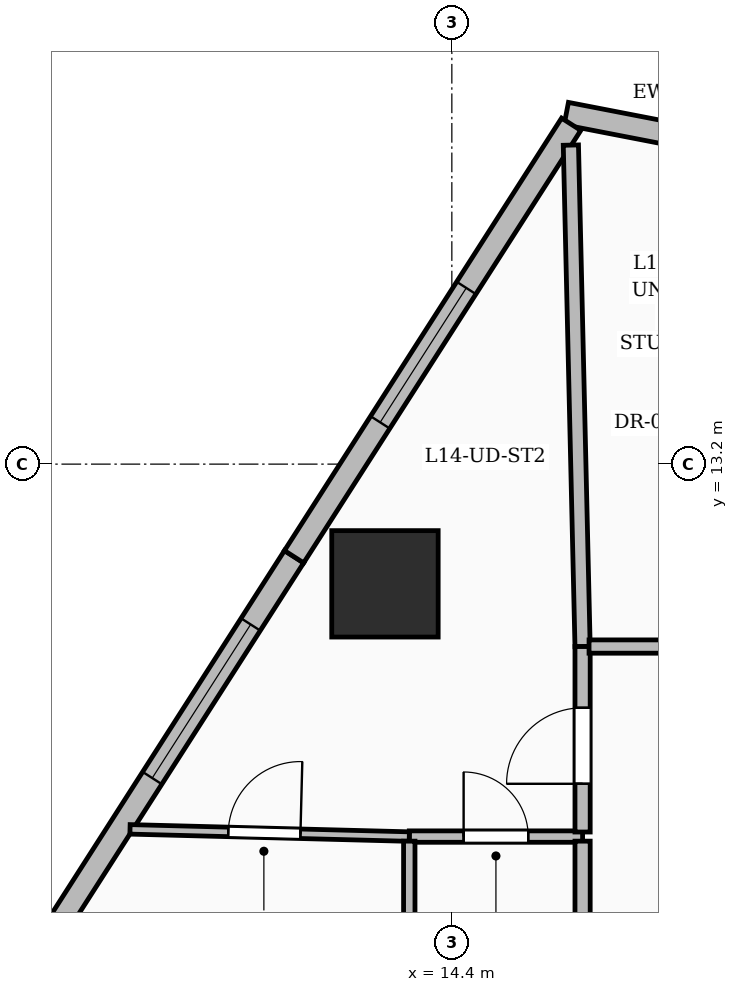
"""IFC4 building model, lengths in metres.
Left out: names, types, materials, properties, quantities, classifications, styles, units other than length and angle.
Written with IfcOpenShell. Run it as: python <this file> out.ifc"""

import sys

from ifc_helpers import new_model, si_unit, direction, frame, frame_2d, origin, origin_2d, place, context, subcontext, project, spatial, rectangle, extrude, element, fill, save


model = new_model("IFC4")
c1 = context("Model", 3, precision=1e-05, world=origin(), true_north=direction((0.0, 1.0)))
c2 = subcontext(c1, "Body", "Model", "MODEL_VIEW")
j1 = project(units=[si_unit("LENGTHUNIT", "METRE"), si_unit("PLANEANGLEUNIT", "RADIAN")], contexts=[c1])
p1 = place(None, origin())
s1 = spatial("IfcSite", under=j1, at=p1, CompositionType="ELEMENT")
p2 = place(p1, origin())
s2 = spatial("IfcBuilding", under=s1, at=p2, CompositionType="ELEMENT")
p3 = place(p2, frame((0.0, 0.0, 60.6)))
s3 = spatial("IfcBuildingStorey", under=s2, at=p3, CompositionType="ELEMENT", Elevation=60.6)
p4 = place(p3, frame((13.52, 11.625, 0.0), z_axis=(0.0, 0.0, 1.0), x_axis=(1.0, 0.0, 0.0)))
e1 = element("IfcColumn", 1, at=p4, inside=s3, PredefinedType="COLUMN", context=c2, shape_type="SweptSolid", body=[
    extrude(rectangle(XDim=1.4, YDim=1.4, at=origin_2d()), origin(), (0.0, 0.0, 1.0), 3.6),
])
p5 = place(p3, frame((15.906, 17.812, 0.0), z_axis=(0.0, 0.0, 1.0), x_axis=(0.981749415704, -0.190179086032, 0.0)))
e2 = element("IfcWall", 2, at=p5, inside=s3, PredefinedType="SOLIDWALL", context=c2, shape_type="SweptSolid", body=[
    extrude(rectangle(XDim=2.801, YDim=0.3, at=frame_2d((1.4, 0.0))), origin(), (0.0, 0.0, 1.0), 2.375),
])
p6 = place(p3, frame((8.859, 6.574, 0.0), z_axis=(0.0, 0.0, 1.0), x_axis=(0.539539001193, 0.841960608456, 0.0)))
e3 = element("IfcWall", 3, at=p6, inside=s3, PredefinedType="SOLIDWALL", context=c2, shape_type="SweptSolid", body=[
    extrude(rectangle(XDim=6.423, YDim=0.3, at=frame_2d((3.211, 0.0))), origin(), (0.0, 0.0, 1.0), 3.35),
])
p7 = place(p6, frame((2.965, 0.0, 0.6)))
e4 = element("IfcOpeningElement", 4, at=p7, cuts=e3, PredefinedType="OPENING", context=c2, shape_type="SweptSolid", body=[
    extrude(rectangle(XDim=2.4, YDim=2.1, at=frame_2d((1.2, 1.05))), frame((0.0, 0.16, 0.0), z_axis=(0.0, -1.0, 0.0), x_axis=(1.0, 0.0, 0.0)), (0.0, 0.0, 1.0), 0.32),
])
p8 = place(p3, frame((12.324, 11.981, 0.0), z_axis=(0.0, 0.0, 1.0), x_axis=(0.539544650361, 0.841956988371, 0.0)))
e5 = element("IfcWall", 5, at=p8, inside=s3, PredefinedType="SOLIDWALL", context=c2, shape_type="SweptSolid", body=[
    extrude(rectangle(XDim=6.758, YDim=0.3, at=frame_2d((3.379, 0.0))), origin(), (0.0, 0.0, 1.0), 3.35),
])
p9 = place(p8, frame((2.1, 0.0, 0.55)))
e6 = element("IfcOpeningElement", 6, at=p9, cuts=e5, PredefinedType="OPENING", context=c2, shape_type="SweptSolid", body=[
    extrude(rectangle(XDim=2.1, YDim=2.4, at=frame_2d((1.05, 1.2))), frame((0.0, 0.16, 0.0), z_axis=(0.0, -1.0, 0.0), x_axis=(1.0, 0.0, 0.0)), (0.0, 0.0, 1.0), 0.32),
])
p10 = place(p3, frame((13.84, 8.3, 0.0), z_axis=(0.0, 0.0, 1.0), x_axis=(1.0, 0.0, 0.0)))
e7 = element("IfcWall", 7, at=p10, inside=s3, PredefinedType="PARTITIONING", context=c2, shape_type="SweptSolid", body=[
    extrude(rectangle(XDim=2.28, YDim=0.15, at=frame_2d((1.14, 0.0))), origin(), (0.0, 0.0, 1.0), 2.37),
])
p11 = place(p10, frame((0.715, 0.0, 0.0)))
e8 = element("IfcOpeningElement", 8, at=p11, cuts=e7, PredefinedType="OPENING", context=c2, shape_type="SweptSolid", body=[
    extrude(rectangle(XDim=0.85, YDim=2.1, at=frame_2d((0.425, 1.05))), frame((0.0, 0.085, 0.0), z_axis=(0.0, -1.0, 0.0), x_axis=(1.0, 0.0, 0.0)), (0.0, 0.0, 1.0), 0.17),
])
p12 = place(p3, frame((10.166, 8.395, 0.0), z_axis=(0.0, 0.0, 1.0), x_axis=(0.999666084673, -0.025840262272, 0.0)))
e9 = element("IfcWall", 9, at=p12, inside=s3, PredefinedType="PARTITIONING", context=c2, shape_type="SweptSolid", body=[
    extrude(rectangle(XDim=3.675, YDim=0.125, at=frame_2d((1.838, 0.0))), origin(), (0.0, 0.0, 1.0), 3.35),
])
p13 = place(p12, frame((1.293, 0.0, 0.0)))
e10 = element("IfcOpeningElement", 10, at=p13, cuts=e9, PredefinedType="OPENING", context=c2, shape_type="SweptSolid", body=[
    extrude(rectangle(XDim=0.95, YDim=2.2, at=frame_2d((0.475, 1.1))), frame((0.0, 0.072, 0.0), z_axis=(0.0, -1.0, 0.0), x_axis=(1.0, 0.0, 0.0)), (0.0, 0.0, 1.0), 0.145),
])
p14 = place(p3, frame((16.12, 10.8, 0.0), z_axis=(0.0, 0.0, 1.0), x_axis=(-0.023345842867, 0.999727448668, 0.0)))
e11 = element("IfcWall", 11, at=p14, inside=s3, PredefinedType="PARTITIONING", context=c2, shape_type="SweptSolid", body=[
    extrude(rectangle(XDim=6.599, YDim=0.2, at=frame_2d((3.299, 0.0))), origin(), (0.0, 0.0, 1.0), 2.279),
])
p15 = place(p3, frame((16.12, 8.36, 0.0), z_axis=(0.0, 0.0, 1.0), x_axis=(0.0, 1.0, 0.0)))
e12 = element("IfcWall", 12, at=p15, inside=s3, PredefinedType="PARTITIONING", context=c2, shape_type="SweptSolid", body=[
    extrude(rectangle(XDim=2.44, YDim=0.2, at=frame_2d((1.22, 0.0))), origin(), (0.0, 0.0, 1.0), 2.279),
])
p16 = place(p15, frame((0.635, 0.0, 0.0)))
e13 = element("IfcOpeningElement", 13, at=p16, cuts=e12, PredefinedType="OPENING", context=c2, shape_type="SweptSolid", body=[
    extrude(rectangle(XDim=1.0, YDim=2.2, at=frame_2d((0.5, 1.1))), frame((0.0, 0.11, 0.0), z_axis=(0.0, -1.0, 0.0), x_axis=(1.0, 0.0, 0.0)), (0.0, 0.0, 1.0), 0.22),
])
p17 = place(p3, frame((13.84, 8.24, 0.0), z_axis=(0.0, 0.0, 1.0), x_axis=(0.0, -1.0, 0.0)))
e14 = element("IfcWall", 14, at=p17, inside=s3, PredefinedType="PARTITIONING", context=c2, shape_type="SweptSolid", body=[
    extrude(rectangle(XDim=6.34, YDim=0.15, at=frame_2d((3.17, 0.0))), origin(), (0.0, 0.0, 1.0), 3.35),
])
p18 = place(p3, frame((16.12, 4.64, 0.0), z_axis=(0.0, 0.0, 1.0), x_axis=(0.0, 1.0, 0.0)))
e15 = element("IfcWall", 15, at=p18, inside=s3, PredefinedType="PARTITIONING", context=c2, shape_type="SweptSolid", body=[
    extrude(rectangle(XDim=3.6, YDim=0.2, at=frame_2d((1.8, 0.0))), origin(), (0.0, 0.0, 1.0), 2.37),
])
p19 = place(p3, frame((16.205, 10.8, 0.0), z_axis=(0.0, 0.0, 1.0), x_axis=(1.0, 0.0, 0.0)))
e16 = element("IfcWall", 16, at=p19, inside=s3, PredefinedType="PARTITIONING", context=c2, shape_type="SweptSolid", body=[
    extrude(rectangle(XDim=2.605, YDim=0.175, at=frame_2d((1.302, 0.0))), origin(), (0.0, 0.0, 1.0), 2.279),
])
p20 = place(p7, origin())
e17 = element("IfcWindow", 17, at=p20, inside=s3, PartitioningType="SINGLE_PANEL", PredefinedType="WINDOW", context=c2, shape_type="SweptSolid", body=[
    extrude(rectangle(XDim=2.4, YDim=2.1, at=frame_2d((1.2, 1.05))), frame((0.0, 0.03, 0.0), z_axis=(0.0, -1.0, 0.0), x_axis=(1.0, 0.0, 0.0)), (0.0, 0.0, 1.0), 0.06),
])
fill(e4, e17)
p21 = place(p9, origin())
e18 = element("IfcWindow", 18, at=p21, inside=s3, PartitioningType="SINGLE_PANEL", PredefinedType="WINDOW", context=c2, shape_type="SweptSolid", body=[
    extrude(rectangle(XDim=2.1, YDim=2.4, at=frame_2d((1.05, 1.2))), frame((0.0, 0.03, 0.0), z_axis=(0.0, -1.0, 0.0), x_axis=(1.0, 0.0, 0.0)), (0.0, 0.0, 1.0), 0.06),
])
fill(e6, e18)
p22 = place(p13, origin())
e19 = element("IfcDoor", 19, at=p22, inside=s3, OperationType="SINGLE_SWING_RIGHT", PredefinedType="DOOR", context=c2, shape_type="SweptSolid", body=[
    extrude(rectangle(XDim=0.95, YDim=2.2, at=frame_2d((0.475, 1.1))), frame((0.0, 0.025, 0.0), z_axis=(0.0, -1.0, 0.0), x_axis=(1.0, 0.0, 0.0)), (0.0, 0.0, 1.0), 0.05),
])
fill(e10, e19)
p23 = place(p11, origin())
e20 = element("IfcDoor", 20, at=p23, inside=s3, OperationType="SINGLE_SWING_LEFT", PredefinedType="DOOR", context=c2, shape_type="SweptSolid", body=[
    extrude(rectangle(XDim=0.85, YDim=2.1, at=frame_2d((0.425, 1.05))), frame((0.0, 0.025, 0.0), z_axis=(0.0, -1.0, 0.0), x_axis=(1.0, 0.0, 0.0)), (0.0, 0.0, 1.0), 0.05),
])
fill(e8, e20)
p24 = place(p16, origin())
e21 = element("IfcDoor", 21, at=p24, inside=s3, OperationType="SINGLE_SWING_LEFT", PredefinedType="DOOR", context=c2, shape_type="SweptSolid", body=[
    extrude(rectangle(XDim=1.0, YDim=2.2, at=frame_2d((0.5, 1.1))), frame((0.0, 0.025, 0.0), z_axis=(0.0, -1.0, 0.0), x_axis=(1.0, 0.0, 0.0)), (0.0, 0.0, 1.0), 0.05),
])
fill(e13, e21)
save(model, sys.argv[1])
